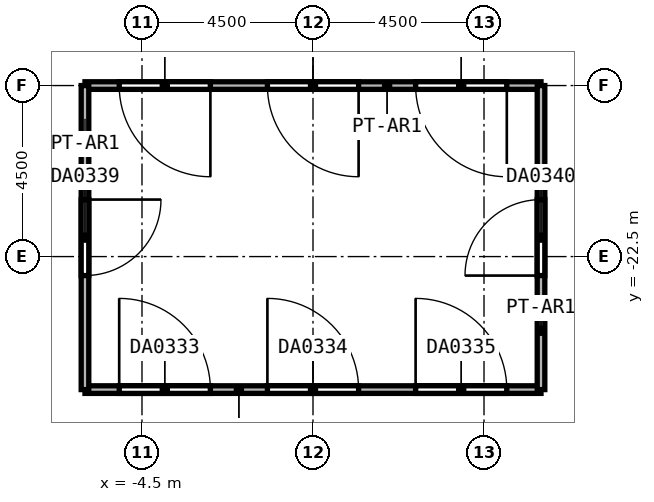
"""IFC4 building model, lengths in metres.
Left out: names, types, materials, properties, quantities, classifications, styles, units other than length and angle.
Written with IfcOpenShell. Run it as: python <this file> out.ifc"""

import sys

from ifc_helpers import new_model, si_unit, direction, frame, frame_2d, origin, place, context, subcontext, project, spatial, rectangle, extrude, element, fill, save


model = new_model("IFC4")
c1 = context("Model", 3, precision=1e-05, world=origin(), true_north=direction((0.0, 1.0)))
c2 = subcontext(c1, "Body", "Model", "MODEL_VIEW")
j1 = project(units=[si_unit("LENGTHUNIT", "METRE"), si_unit("PLANEANGLEUNIT", "RADIAN")], contexts=[c1])
p1 = place(None, origin())
s1 = spatial("IfcSite", under=j1, at=p1, CompositionType="ELEMENT")
p2 = place(p1, origin())
s2 = spatial("IfcBuilding", under=s1, at=p2, CompositionType="ELEMENT")
p3 = place(p2, origin())
s3 = spatial("IfcBuildingStorey", under=s2, at=p3, CompositionType="ELEMENT", Elevation=0.0)
p4 = place(p3, frame((-6.0, -26.0, 0.0), z_axis=(0.0, 0.0, 1.0), x_axis=(1.0, 0.0, 0.0)))
e1 = element("IfcWall", 1, at=p4, inside=s3, PredefinedType="PARTITIONING", context=c2, shape_type="SweptSolid", body=[
    extrude(rectangle(XDim=12.0, YDim=0.2, at=frame_2d((6.0, 0.0))), origin(), (0.0, 0.0, 1.0), 11.7),
])
p5 = place(p4, frame((0.9, 0.0, 0.0)))
e2 = element("IfcOpeningElement", 2, at=p5, cuts=e1, PredefinedType="OPENING", context=c2, shape_type="SweptSolid", body=[
    extrude(rectangle(XDim=2.4, YDim=2.4, at=frame_2d((1.2, 1.2))), frame((0.0, 0.1, 0.0), z_axis=(0.0, -1.0, 0.0), x_axis=(1.0, 0.0, 0.0)), (0.0, 0.0, 1.0), 0.2),
])
p6 = place(p4, frame((4.8, 0.0, 0.0)))
e3 = element("IfcOpeningElement", 3, at=p6, cuts=e1, PredefinedType="OPENING", context=c2, shape_type="SweptSolid", body=[
    extrude(rectangle(XDim=2.4, YDim=2.4, at=frame_2d((1.2, 1.2))), frame((0.0, 0.1, 0.0), z_axis=(0.0, -1.0, 0.0), x_axis=(1.0, 0.0, 0.0)), (0.0, 0.0, 1.0), 0.2),
])
p7 = place(p4, frame((8.7, 0.0, 0.0)))
e4 = element("IfcOpeningElement", 4, at=p7, cuts=e1, PredefinedType="OPENING", context=c2, shape_type="SweptSolid", body=[
    extrude(rectangle(XDim=2.4, YDim=2.4, at=frame_2d((1.2, 1.2))), frame((0.0, 0.1, 0.0), z_axis=(0.0, -1.0, 0.0), x_axis=(1.0, 0.0, 0.0)), (0.0, 0.0, 1.0), 0.2),
])
p8 = place(p3, frame((6.0, -18.0, 0.0), z_axis=(0.0, 0.0, 1.0), x_axis=(-1.0, 0.0, 0.0)))
e5 = element("IfcWall", 5, at=p8, inside=s3, PredefinedType="PARTITIONING", context=c2, shape_type="SweptSolid", body=[
    extrude(rectangle(XDim=12.0, YDim=0.2, at=frame_2d((6.0, 0.0))), origin(), (0.0, 0.0, 1.0), 11.7),
])
p9 = place(p8, frame((0.9, 0.0, 0.0)))
e6 = element("IfcOpeningElement", 6, at=p9, cuts=e5, PredefinedType="OPENING", context=c2, shape_type="SweptSolid", body=[
    extrude(rectangle(XDim=2.4, YDim=2.4, at=frame_2d((1.2, 1.2))), frame((0.0, 0.1, 0.0), z_axis=(0.0, -1.0, 0.0), x_axis=(1.0, 0.0, 0.0)), (0.0, 0.0, 1.0), 0.2),
])
p10 = place(p8, frame((4.8, 0.0, 0.0)))
e7 = element("IfcOpeningElement", 7, at=p10, cuts=e5, PredefinedType="OPENING", context=c2, shape_type="SweptSolid", body=[
    extrude(rectangle(XDim=2.4, YDim=2.4, at=frame_2d((1.2, 1.2))), frame((0.0, 0.1, 0.0), z_axis=(0.0, -1.0, 0.0), x_axis=(1.0, 0.0, 0.0)), (0.0, 0.0, 1.0), 0.2),
])
p11 = place(p8, frame((8.7, 0.0, 0.0)))
e8 = element("IfcOpeningElement", 8, at=p11, cuts=e5, PredefinedType="OPENING", context=c2, shape_type="SweptSolid", body=[
    extrude(rectangle(XDim=2.4, YDim=2.4, at=frame_2d((1.2, 1.2))), frame((0.0, 0.1, 0.0), z_axis=(0.0, -1.0, 0.0), x_axis=(1.0, 0.0, 0.0)), (0.0, 0.0, 1.0), 0.2),
])
p12 = place(p3, frame((-6.0, -18.0, 0.0), z_axis=(0.0, 0.0, 1.0), x_axis=(0.0, -1.0, 0.0)))
e9 = element("IfcWall", 9, at=p12, inside=s3, PredefinedType="PARTITIONING", context=c2, shape_type="SweptSolid", body=[
    extrude(rectangle(XDim=8.0, YDim=0.2, at=frame_2d((4.0, 0.0))), origin(), (0.0, 0.0, 1.0), 11.7),
])
p13 = place(p12, frame((3.0, 0.0, 0.0)))
e10 = element("IfcOpeningElement", 10, at=p13, cuts=e9, PredefinedType="OPENING", context=c2, shape_type="SweptSolid", body=[
    extrude(rectangle(XDim=2.0, YDim=2.4, at=frame_2d((1.0, 1.2))), frame((0.0, 0.1, 0.0), z_axis=(0.0, -1.0, 0.0), x_axis=(1.0, 0.0, 0.0)), (0.0, 0.0, 1.0), 0.2),
])
p14 = place(p3, frame((6.0, -26.0, 0.0), z_axis=(0.0, 0.0, 1.0), x_axis=(0.0, 1.0, 0.0)))
e11 = element("IfcWall", 11, at=p14, inside=s3, PredefinedType="PARTITIONING", context=c2, shape_type="SweptSolid", body=[
    extrude(rectangle(XDim=8.0, YDim=0.2, at=frame_2d((4.0, 0.0))), origin(), (0.0, 0.0, 1.0), 11.7),
])
p15 = place(p14, frame((3.0, 0.0, 0.0)))
e12 = element("IfcOpeningElement", 12, at=p15, cuts=e11, PredefinedType="OPENING", context=c2, shape_type="SweptSolid", body=[
    extrude(rectangle(XDim=2.0, YDim=2.4, at=frame_2d((1.0, 1.2))), frame((0.0, 0.1, 0.0), z_axis=(0.0, -1.0, 0.0), x_axis=(1.0, 0.0, 0.0)), (0.0, 0.0, 1.0), 0.2),
])
p16 = place(p5, frame((2.4, 0.0, 0.0), z_axis=(0.0, 0.0, 1.0), x_axis=(-1.0, 0.0, 0.0)))
e13 = element("IfcDoor", 13, at=p16, inside=s3, OperationType="DOUBLE_DOOR_SINGLE_SWING", PredefinedType="DOOR", context=c2, shape_type="SweptSolid", body=[
    extrude(rectangle(XDim=2.4, YDim=2.4, at=frame_2d((1.2, 1.2))), frame((0.0, 0.025, 0.0), z_axis=(0.0, -1.0, 0.0), x_axis=(1.0, 0.0, 0.0)), (0.0, 0.0, 1.0), 0.05),
])
fill(e2, e13)
p17 = place(p6, frame((2.4, 0.0, 0.0), z_axis=(0.0, 0.0, 1.0), x_axis=(-1.0, 0.0, 0.0)))
e14 = element("IfcDoor", 14, at=p17, inside=s3, OperationType="DOUBLE_DOOR_SINGLE_SWING", PredefinedType="DOOR", context=c2, shape_type="SweptSolid", body=[
    extrude(rectangle(XDim=2.4, YDim=2.4, at=frame_2d((1.2, 1.2))), frame((0.0, 0.025, 0.0), z_axis=(0.0, -1.0, 0.0), x_axis=(1.0, 0.0, 0.0)), (0.0, 0.0, 1.0), 0.05),
])
fill(e3, e14)
p18 = place(p7, frame((2.4, 0.0, 0.0), z_axis=(0.0, 0.0, 1.0), x_axis=(-1.0, 0.0, 0.0)))
e15 = element("IfcDoor", 15, at=p18, inside=s3, OperationType="DOUBLE_DOOR_SINGLE_SWING", PredefinedType="DOOR", context=c2, shape_type="SweptSolid", body=[
    extrude(rectangle(XDim=2.4, YDim=2.4, at=frame_2d((1.2, 1.2))), frame((0.0, 0.025, 0.0), z_axis=(0.0, -1.0, 0.0), x_axis=(1.0, 0.0, 0.0)), (0.0, 0.0, 1.0), 0.05),
])
fill(e4, e15)
p19 = place(p9, frame((2.4, 0.0, 0.0), z_axis=(0.0, 0.0, 1.0), x_axis=(-1.0, 0.0, 0.0)))
e16 = element("IfcDoor", 16, at=p19, inside=s3, OperationType="DOUBLE_DOOR_SINGLE_SWING", PredefinedType="DOOR", context=c2, shape_type="SweptSolid", body=[
    extrude(rectangle(XDim=2.4, YDim=2.4, at=frame_2d((1.2, 1.2))), frame((0.0, 0.025, 0.0), z_axis=(0.0, -1.0, 0.0), x_axis=(1.0, 0.0, 0.0)), (0.0, 0.0, 1.0), 0.05),
])
fill(e6, e16)
p20 = place(p10, frame((2.4, 0.0, 0.0), z_axis=(0.0, 0.0, 1.0), x_axis=(-1.0, 0.0, 0.0)))
e17 = element("IfcDoor", 17, at=p20, inside=s3, OperationType="DOUBLE_DOOR_SINGLE_SWING", PredefinedType="DOOR", context=c2, shape_type="SweptSolid", body=[
    extrude(rectangle(XDim=2.4, YDim=2.4, at=frame_2d((1.2, 1.2))), frame((0.0, 0.025, 0.0), z_axis=(0.0, -1.0, 0.0), x_axis=(1.0, 0.0, 0.0)), (0.0, 0.0, 1.0), 0.05),
])
fill(e7, e17)
p21 = place(p11, frame((2.4, 0.0, 0.0), z_axis=(0.0, 0.0, 1.0), x_axis=(-1.0, 0.0, 0.0)))
e18 = element("IfcDoor", 18, at=p21, inside=s3, OperationType="DOUBLE_DOOR_SINGLE_SWING", PredefinedType="DOOR", context=c2, shape_type="SweptSolid", body=[
    extrude(rectangle(XDim=2.4, YDim=2.4, at=frame_2d((1.2, 1.2))), frame((0.0, 0.025, 0.0), z_axis=(0.0, -1.0, 0.0), x_axis=(1.0, 0.0, 0.0)), (0.0, 0.0, 1.0), 0.05),
])
fill(e8, e18)
p22 = place(p13, frame((2.0, 0.0, 0.0), z_axis=(0.0, 0.0, 1.0), x_axis=(-1.0, 0.0, 0.0)))
e19 = element("IfcDoor", 19, at=p22, inside=s3, OperationType="DOUBLE_DOOR_SINGLE_SWING", PredefinedType="DOOR", context=c2, shape_type="SweptSolid", body=[
    extrude(rectangle(XDim=2.0, YDim=2.4, at=frame_2d((1.0, 1.2))), frame((0.0, 0.025, 0.0), z_axis=(0.0, -1.0, 0.0), x_axis=(1.0, 0.0, 0.0)), (0.0, 0.0, 1.0), 0.05),
])
fill(e10, e19)
p23 = place(p15, frame((2.0, 0.0, 0.0), z_axis=(0.0, 0.0, 1.0), x_axis=(-1.0, 0.0, 0.0)))
e20 = element("IfcDoor", 20, at=p23, inside=s3, OperationType="DOUBLE_DOOR_SINGLE_SWING", PredefinedType="DOOR", context=c2, shape_type="SweptSolid", body=[
    extrude(rectangle(XDim=2.0, YDim=2.4, at=frame_2d((1.0, 1.2))), frame((0.0, 0.025, 0.0), z_axis=(0.0, -1.0, 0.0), x_axis=(1.0, 0.0, 0.0)), (0.0, 0.0, 1.0), 0.05),
])
fill(e12, e20)
save(model, sys.argv[1])
